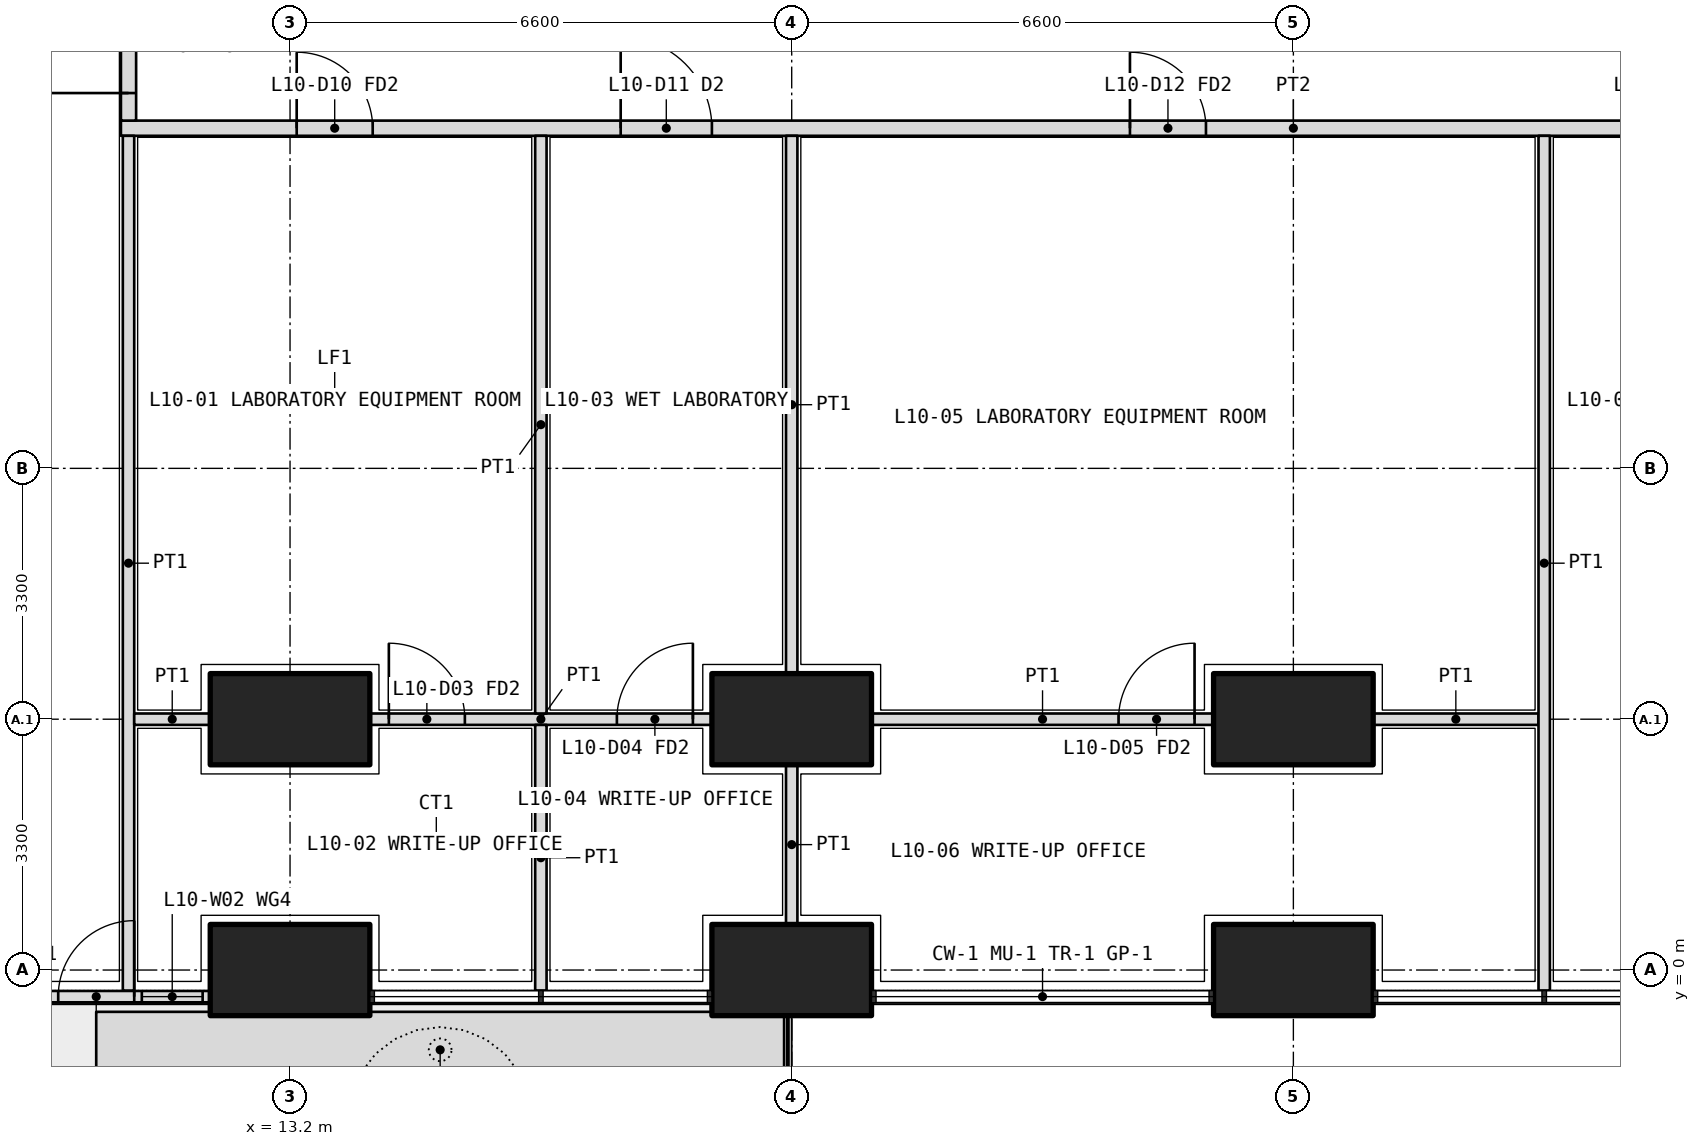
"""IFC4 building model, lengths in metres.
Left out: names, types, materials, properties, quantities, classifications, styles, units other than length and angle.
Written with IfcOpenShell. Run it as: python <this file> out.ifc"""

import sys

from ifc_helpers import new_model, si_unit, direction, frame, frame_2d, origin, origin_2d, place, context, subcontext, project, spatial, polyline, rectangle, outline, extrude, element, fill, save


model = new_model("IFC4")
c1 = context("Model", 3, precision=1e-05, world=origin(), true_north=direction((0.0, 1.0)))
c2 = subcontext(c1, "Body", "Model", "MODEL_VIEW")
j1 = project(units=[si_unit("LENGTHUNIT", "METRE"), si_unit("PLANEANGLEUNIT", "RADIAN")], contexts=[c1])
p1 = place(None, origin())
s1 = spatial("IfcSite", under=j1, at=p1, CompositionType="ELEMENT")
p2 = place(p1, origin())
s2 = spatial("IfcBuilding", under=s1, at=p2, CompositionType="ELEMENT")
p3 = place(p2, frame((0.0, 0.0, 46.5)))
s3 = spatial("IfcBuildingStorey", under=s2, at=p3, CompositionType="ELEMENT", Elevation=46.5)
for number, where, z_axis, x_axis in (
    (1, (13.2, 0.0, 0.0), (0.0, 0.0, 1.0), (1.0, 0.0, 0.0)),
    (2, (19.8, 0.0, 0.0), (0.0, 0.0, 1.0), (1.0, 0.0, 0.0)),
    (3, (26.4, 0.0, 0.0), (0.0, 0.0, 1.0), (1.0, 0.0, 0.0)),
    (4, (13.2, 3.3, 0.0), (0.0, 0.0, 1.0), (1.0, 0.0, 0.0)),
    (5, (19.8, 3.3, 0.0), (0.0, 0.0, 1.0), (1.0, 0.0, 0.0)),
    (6, (26.4, 3.3, 0.0), (0.0, 0.0, 1.0), (1.0, 0.0, 0.0)),
):
    element("IfcColumn", number, at=place(p3, frame(where, z_axis=z_axis, x_axis=x_axis)), inside=s3, PredefinedType="COLUMN", context=c2, shape_type="SweptSolid", body=[
        extrude(rectangle(XDim=2.1, YDim=1.2, at=origin_2d()), origin(), (0.0, 0.0, 1.0), 4.2),
    ])
p4 = place(p3, origin())
e7 = element("IfcWall", 7, at=p4, inside=s3, PredefinedType="USERDEFINED", context=c2, shape_type="SweptSolid", body=[
    extrude(outline(polyline([(10.65, -1.55), (19.7, -1.55), (19.7, -0.55), (10.65, -0.55), (10.65, -1.55)]), holes=[polyline([(10.8, -1.4), (19.55, -1.4), (19.55, -0.7), (10.8, -0.7), (10.8, -1.4)])]), origin(), (0.0, 0.0, 1.0), 1.05),
])
p5 = place(p3, frame((7.65, -0.35, 0.0), z_axis=(0.0, 0.0, 1.0), x_axis=(1.0, 0.0, 0.0)))
e8 = element("IfcWall", 8, at=p5, inside=s3, PredefinedType="SOLIDWALL", context=c2, shape_type="SweptSolid", body=[
    extrude(rectangle(XDim=4.5, YDim=0.15, at=frame_2d((2.25, 0.0))), origin(), (0.0, 0.0, 1.0), 2.7),
])
p6 = place(p5, frame((2.5, 0.0, 0.0)))
e9 = element("IfcOpeningElement", 9, at=p6, cuts=e8, PredefinedType="OPENING", context=c2, shape_type="SweptSolid", body=[
    extrude(rectangle(XDim=1.0, YDim=2.4, at=frame_2d((0.5, 1.2))), frame((0.0, 0.085, 0.0), z_axis=(0.0, -1.0, 0.0), x_axis=(1.0, 0.0, 0.0)), (0.0, 0.0, 1.0), 0.17),
])
p7 = place(p5, frame((0.1, 0.0, 0.1)))
e10 = element("IfcOpeningElement", 10, at=p7, cuts=e8, PredefinedType="OPENING", context=c2, shape_type="SweptSolid", body=[
    extrude(rectangle(XDim=1.9, YDim=2.3, at=frame_2d((0.95, 1.15))), frame((0.0, 0.085, 0.0), z_axis=(0.0, -1.0, 0.0), x_axis=(1.0, 0.0, 0.0)), (0.0, 0.0, 1.0), 0.17),
])
p8 = place(p5, frame((3.6, 0.0, 0.1)))
e11 = element("IfcOpeningElement", 11, at=p8, cuts=e8, PredefinedType="OPENING", context=c2, shape_type="SweptSolid", body=[
    extrude(rectangle(XDim=0.8, YDim=2.3, at=frame_2d((0.4, 1.15))), frame((0.0, 0.085, 0.0), z_axis=(0.0, -1.0, 0.0), x_axis=(1.0, 0.0, 0.0)), (0.0, 0.0, 1.0), 0.17),
])
p9 = place(p3, frame((10.975, 11.075, 0.0), z_axis=(0.0, 0.0, 1.0), x_axis=(1.0, 0.0, 0.0)))
e12 = element("IfcWall", 12, at=p9, inside=s3, PredefinedType="PARTITIONING", context=c2, shape_type="SweptSolid", body=[
    extrude(rectangle(XDim=30.85, YDim=0.2, at=frame_2d((15.425, 0.0))), origin(), (0.0, 0.0, 1.0), 2.85),
])
p10 = place(p9, frame((2.312, 0.0, 0.0)))
e13 = element("IfcOpeningElement", 13, at=p10, cuts=e12, PredefinedType="OPENING", context=c2, shape_type="SweptSolid", body=[
    extrude(rectangle(XDim=1.0, YDim=2.1, at=frame_2d((0.5, 1.05))), frame((0.0, 0.11, 0.0), z_axis=(0.0, -1.0, 0.0), x_axis=(1.0, 0.0, 0.0)), (0.0, 0.0, 1.0), 0.22),
])
p11 = place(p9, frame((6.575, 0.0, 0.0)))
e14 = element("IfcOpeningElement", 14, at=p11, cuts=e12, PredefinedType="OPENING", context=c2, shape_type="SweptSolid", body=[
    extrude(rectangle(XDim=1.2, YDim=2.1, at=frame_2d((0.6, 1.05))), frame((0.0, 0.11, 0.0), z_axis=(0.0, -1.0, 0.0), x_axis=(1.0, 0.0, 0.0)), (0.0, 0.0, 1.0), 0.22),
])
p12 = place(p9, frame((13.275, 0.0, 0.0)))
e15 = element("IfcOpeningElement", 15, at=p12, cuts=e12, PredefinedType="OPENING", context=c2, shape_type="SweptSolid", body=[
    extrude(rectangle(XDim=1.0, YDim=2.1, at=frame_2d((0.5, 1.05))), frame((0.0, 0.11, 0.0), z_axis=(0.0, -1.0, 0.0), x_axis=(1.0, 0.0, 0.0)), (0.0, 0.0, 1.0), 0.22),
])
p13 = place(p9, frame((19.975, 0.0, 0.0)))
e16 = element("IfcOpeningElement", 16, at=p13, cuts=e12, PredefinedType="OPENING", context=c2, shape_type="SweptSolid", body=[
    extrude(rectangle(XDim=1.0, YDim=2.1, at=frame_2d((0.5, 1.05))), frame((0.0, 0.11, 0.0), z_axis=(0.0, -1.0, 0.0), x_axis=(1.0, 0.0, 0.0)), (0.0, 0.0, 1.0), 0.22),
])
p14 = place(p9, frame((23.275, 0.0, 0.0)))
e17 = element("IfcOpeningElement", 17, at=p14, cuts=e12, PredefinedType="OPENING", context=c2, shape_type="SweptSolid", body=[
    extrude(rectangle(XDim=1.0, YDim=2.1, at=frame_2d((0.5, 1.05))), frame((0.0, 0.11, 0.0), z_axis=(0.0, -1.0, 0.0), x_axis=(1.0, 0.0, 0.0)), (0.0, 0.0, 1.0), 0.22),
])
p15 = place(p9, frame((27.438, 0.0, 0.0)))
e18 = element("IfcOpeningElement", 18, at=p15, cuts=e12, PredefinedType="OPENING", context=c2, shape_type="SweptSolid", body=[
    extrude(rectangle(XDim=1.2, YDim=2.1, at=frame_2d((0.6, 1.05))), frame((0.0, 0.11, 0.0), z_axis=(0.0, -1.0, 0.0), x_axis=(1.0, 0.0, 0.0)), (0.0, 0.0, 1.0), 0.22),
])
p16 = place(p3, frame((11.075, 11.175, 0.0), z_axis=(0.0, 0.0, 1.0), x_axis=(0.0, 1.0, 0.0)))
e19 = element("IfcWall", 19, at=p16, inside=s3, PredefinedType="PARTITIONING", context=c2, shape_type="SweptSolid", body=[
    extrude(rectangle(XDim=15.225, YDim=0.2, at=frame_2d((7.612, 0.0))), origin(), (0.0, 0.0, 1.0), 2.85),
])
p17 = place(p16, frame((0.363, 0.0, 0.0)))
e20 = element("IfcOpeningElement", 20, at=p17, cuts=e19, PredefinedType="OPENING", context=c2, shape_type="SweptSolid", body=[
    extrude(rectangle(XDim=1.2, YDim=2.1, at=frame_2d((0.6, 1.05))), frame((0.0, 0.11, 0.0), z_axis=(0.0, -1.0, 0.0), x_axis=(1.0, 0.0, 0.0)), (0.0, 0.0, 1.0), 0.22),
])
p18 = place(p16, frame((2.575, 0.0, 0.0)))
e21 = element("IfcOpeningElement", 21, at=p18, cuts=e19, PredefinedType="OPENING", context=c2, shape_type="SweptSolid", body=[
    extrude(rectangle(XDim=1.0, YDim=2.1, at=frame_2d((0.5, 1.05))), frame((0.0, 0.11, 0.0), z_axis=(0.0, -1.0, 0.0), x_axis=(1.0, 0.0, 0.0)), (0.0, 0.0, 1.0), 0.22),
])
p19 = place(p16, frame((5.625, 0.0, 0.0)))
e22 = element("IfcOpeningElement", 22, at=p19, cuts=e19, PredefinedType="OPENING", context=c2, shape_type="SweptSolid", body=[
    extrude(rectangle(XDim=0.9, YDim=2.1, at=frame_2d((0.45, 1.05))), frame((0.0, 0.11, 0.0), z_axis=(0.0, -1.0, 0.0), x_axis=(1.0, 0.0, 0.0)), (0.0, 0.0, 1.0), 0.22),
])
p20 = place(p16, frame((9.425, 0.0, 0.0)))
e23 = element("IfcOpeningElement", 23, at=p20, cuts=e19, PredefinedType="OPENING", context=c2, shape_type="SweptSolid", body=[
    extrude(rectangle(XDim=0.9, YDim=2.1, at=frame_2d((0.45, 1.05))), frame((0.0, 0.11, 0.0), z_axis=(0.0, -1.0, 0.0), x_axis=(1.0, 0.0, 0.0)), (0.0, 0.0, 1.0), 0.22),
])
p21 = place(p16, frame((12.975, 0.0, 0.0)))
e24 = element("IfcOpeningElement", 24, at=p21, cuts=e19, PredefinedType="OPENING", context=c2, shape_type="SweptSolid", body=[
    extrude(rectangle(XDim=1.0, YDim=2.1, at=frame_2d((0.5, 1.05))), frame((0.0, 0.11, 0.0), z_axis=(0.0, -1.0, 0.0), x_axis=(1.0, 0.0, 0.0)), (0.0, 0.0, 1.0), 0.22),
])
p22 = place(p3, frame((11.075, -0.27, 0.0), z_axis=(0.0, 0.0, 1.0), x_axis=(0.0, 1.0, 0.0)))
e25 = element("IfcWall", 25, at=p22, inside=s3, PredefinedType="PARTITIONING", context=c2, shape_type="SweptSolid", body=[
    extrude(rectangle(XDim=11.245, YDim=0.15, at=frame_2d((5.623, 0.0))), origin(), (0.0, 0.0, 1.0), 2.7),
])
p23 = place(p3, frame((11.15, 3.3, 0.0), z_axis=(0.0, 0.0, 1.0), x_axis=(1.0, 0.0, 0.0)))
e26 = element("IfcWall", 26, at=p23, inside=s3, PredefinedType="PARTITIONING", context=c2, shape_type="SweptSolid", body=[
    extrude(rectangle(XDim=1.0, YDim=0.15, at=frame_2d((0.5, 0.0))), origin(), (0.0, 0.0, 1.0), 3.9),
])
p24 = place(p3, frame((14.25, 3.3, 0.0), z_axis=(0.0, 0.0, 1.0), x_axis=(1.0, 0.0, 0.0)))
e27 = element("IfcWall", 27, at=p24, inside=s3, PredefinedType="PARTITIONING", context=c2, shape_type="SweptSolid", body=[
    extrude(rectangle(XDim=4.5, YDim=0.15, at=frame_2d((2.25, 0.0))), origin(), (0.0, 0.0, 1.0), 3.9),
])
p25 = place(p24, frame((0.25, 0.0, 0.0)))
e28 = element("IfcOpeningElement", 28, at=p25, cuts=e27, PredefinedType="OPENING", context=c2, shape_type="SweptSolid", body=[
    extrude(rectangle(XDim=1.0, YDim=2.1, at=frame_2d((0.5, 1.05))), frame((0.0, 0.085, 0.0), z_axis=(0.0, -1.0, 0.0), x_axis=(1.0, 0.0, 0.0)), (0.0, 0.0, 1.0), 0.17),
])
p26 = place(p24, frame((3.25, 0.0, 0.0)))
e29 = element("IfcOpeningElement", 29, at=p26, cuts=e27, PredefinedType="OPENING", context=c2, shape_type="SweptSolid", body=[
    extrude(rectangle(XDim=1.0, YDim=2.1, at=frame_2d((0.5, 1.05))), frame((0.0, 0.085, 0.0), z_axis=(0.0, -1.0, 0.0), x_axis=(1.0, 0.0, 0.0)), (0.0, 0.0, 1.0), 0.17),
])
p27 = place(p3, frame((20.85, 3.3, 0.0), z_axis=(0.0, 0.0, 1.0), x_axis=(1.0, 0.0, 0.0)))
e30 = element("IfcWall", 30, at=p27, inside=s3, PredefinedType="PARTITIONING", context=c2, shape_type="SweptSolid", body=[
    extrude(rectangle(XDim=4.5, YDim=0.15, at=frame_2d((2.25, 0.0))), origin(), (0.0, 0.0, 1.0), 3.9),
])
p28 = place(p27, frame((3.25, 0.0, 0.0)))
e31 = element("IfcOpeningElement", 31, at=p28, cuts=e30, PredefinedType="OPENING", context=c2, shape_type="SweptSolid", body=[
    extrude(rectangle(XDim=1.0, YDim=2.1, at=frame_2d((0.5, 1.05))), frame((0.0, 0.085, 0.0), z_axis=(0.0, -1.0, 0.0), x_axis=(1.0, 0.0, 0.0)), (0.0, 0.0, 1.0), 0.17),
])
p29 = place(p3, frame((27.45, 3.3, 0.0), z_axis=(0.0, 0.0, 1.0), x_axis=(1.0, 0.0, 0.0)))
e32 = element("IfcWall", 32, at=p29, inside=s3, PredefinedType="PARTITIONING", context=c2, shape_type="SweptSolid", body=[
    extrude(rectangle(XDim=2.175, YDim=0.15, at=frame_2d((1.087, 0.0))), origin(), (0.0, 0.0, 1.0), 3.9),
])
p30 = place(p3, frame((16.5, -0.27, 0.0), z_axis=(0.0, 0.0, 1.0), x_axis=(0.0, 1.0, 0.0)))
e33 = element("IfcWall", 33, at=p30, inside=s3, PredefinedType="PARTITIONING", context=c2, shape_type="SweptSolid", body=[
    extrude(rectangle(XDim=3.495, YDim=0.15, at=frame_2d((1.748, 0.0))), origin(), (0.0, 0.0, 1.0), 2.7),
])
p31 = place(p3, frame((16.5, 3.375, 0.0), z_axis=(0.0, 0.0, 1.0), x_axis=(0.0, 1.0, 0.0)))
e34 = element("IfcWall", 34, at=p31, inside=s3, PredefinedType="PARTITIONING", context=c2, shape_type="SweptSolid", body=[
    extrude(rectangle(XDim=7.6, YDim=0.15, at=frame_2d((3.8, 0.0))), origin(), (0.0, 0.0, 1.0), 3.9),
])
p32 = place(p3, frame((19.8, 0.6, 0.0), z_axis=(0.0, 0.0, 1.0), x_axis=(0.0, 1.0, 0.0)))
e35 = element("IfcWall", 35, at=p32, inside=s3, PredefinedType="PARTITIONING", context=c2, shape_type="SweptSolid", body=[
    extrude(rectangle(XDim=2.1, YDim=0.15, at=frame_2d((1.05, 0.0))), origin(), (0.0, 0.0, 1.0), 2.85),
])
p33 = place(p3, frame((19.8, 3.9, 0.0), z_axis=(0.0, 0.0, 1.0), x_axis=(0.0, 1.0, 0.0)))
e36 = element("IfcWall", 36, at=p33, inside=s3, PredefinedType="PARTITIONING", context=c2, shape_type="SweptSolid", body=[
    extrude(rectangle(XDim=7.075, YDim=0.15, at=frame_2d((3.538, 0.0))), origin(), (0.0, 0.0, 1.0), 2.85),
])
p34 = place(p3, frame((29.7, -0.27, 0.0), z_axis=(0.0, 0.0, 1.0), x_axis=(0.0, 1.0, 0.0)))
e37 = element("IfcWall", 37, at=p34, inside=s3, PredefinedType="PARTITIONING", context=c2, shape_type="SweptSolid", body=[
    extrude(rectangle(XDim=11.245, YDim=0.15, at=frame_2d((5.623, 0.0))), origin(), (0.0, 0.0, 1.0), 2.7),
])
p35 = place(p6, origin())
e38 = element("IfcDoor", 38, at=p35, inside=s3, OperationType="SINGLE_SWING_RIGHT", PredefinedType="DOOR", context=c2, shape_type="SweptSolid", body=[
    extrude(rectangle(XDim=1.0, YDim=2.4, at=frame_2d((0.5, 1.2))), frame((0.0, 0.025, 0.0), z_axis=(0.0, -1.0, 0.0), x_axis=(1.0, 0.0, 0.0)), (0.0, 0.0, 1.0), 0.05),
])
fill(e9, e38)
p36 = place(p8, origin())
e39 = element("IfcWindow", 39, at=p36, inside=s3, PartitioningType="SINGLE_PANEL", PredefinedType="WINDOW", context=c2, shape_type="SweptSolid", body=[
    extrude(rectangle(XDim=0.8, YDim=2.3, at=frame_2d((0.4, 1.15))), frame((0.0, 0.03, 0.0), z_axis=(0.0, -1.0, 0.0), x_axis=(1.0, 0.0, 0.0)), (0.0, 0.0, 1.0), 0.06),
])
fill(e11, e39)
p37 = place(p10, origin())
e40 = element("IfcDoor", 40, at=p37, inside=s3, OperationType="SINGLE_SWING_LEFT", PredefinedType="DOOR", context=c2, shape_type="SweptSolid", body=[
    extrude(rectangle(XDim=1.0, YDim=2.1, at=frame_2d((0.5, 1.05))), frame((0.0, 0.025, 0.0), z_axis=(0.0, -1.0, 0.0), x_axis=(1.0, 0.0, 0.0)), (0.0, 0.0, 1.0), 0.05),
])
fill(e13, e40)
p38 = place(p25, origin())
e41 = element("IfcDoor", 41, at=p38, inside=s3, OperationType="SINGLE_SWING_LEFT", PredefinedType="DOOR", context=c2, shape_type="SweptSolid", body=[
    extrude(rectangle(XDim=1.0, YDim=2.1, at=frame_2d((0.5, 1.05))), frame((0.0, 0.025, 0.0), z_axis=(0.0, -1.0, 0.0), x_axis=(1.0, 0.0, 0.0)), (0.0, 0.0, 1.0), 0.05),
])
fill(e28, e41)
p39 = place(p11, origin())
e42 = element("IfcDoor", 42, at=p39, inside=s3, OperationType="DOUBLE_DOOR_SINGLE_SWING", PredefinedType="DOOR", context=c2, shape_type="SweptSolid", body=[
    extrude(rectangle(XDim=1.2, YDim=2.1, at=frame_2d((0.6, 1.05))), frame((0.0, 0.025, 0.0), z_axis=(0.0, -1.0, 0.0), x_axis=(1.0, 0.0, 0.0)), (0.0, 0.0, 1.0), 0.05),
])
fill(e14, e42)
p40 = place(p26, origin())
e43 = element("IfcDoor", 43, at=p40, inside=s3, OperationType="SINGLE_SWING_RIGHT", PredefinedType="DOOR", context=c2, shape_type="SweptSolid", body=[
    extrude(rectangle(XDim=1.0, YDim=2.1, at=frame_2d((0.5, 1.05))), frame((0.0, 0.025, 0.0), z_axis=(0.0, -1.0, 0.0), x_axis=(1.0, 0.0, 0.0)), (0.0, 0.0, 1.0), 0.05),
])
fill(e29, e43)
p41 = place(p12, origin())
e44 = element("IfcDoor", 44, at=p41, inside=s3, OperationType="SINGLE_SWING_LEFT", PredefinedType="DOOR", context=c2, shape_type="SweptSolid", body=[
    extrude(rectangle(XDim=1.0, YDim=2.1, at=frame_2d((0.5, 1.05))), frame((0.0, 0.025, 0.0), z_axis=(0.0, -1.0, 0.0), x_axis=(1.0, 0.0, 0.0)), (0.0, 0.0, 1.0), 0.05),
])
fill(e15, e44)
p42 = place(p28, origin())
e45 = element("IfcDoor", 45, at=p42, inside=s3, OperationType="SINGLE_SWING_RIGHT", PredefinedType="DOOR", context=c2, shape_type="SweptSolid", body=[
    extrude(rectangle(XDim=1.0, YDim=2.1, at=frame_2d((0.5, 1.05))), frame((0.0, 0.025, 0.0), z_axis=(0.0, -1.0, 0.0), x_axis=(1.0, 0.0, 0.0)), (0.0, 0.0, 1.0), 0.05),
])
fill(e31, e45)
p43 = place(p17, origin())
e46 = element("IfcDoor", 46, at=p43, inside=s3, OperationType="DOUBLE_DOOR_SINGLE_SWING", PredefinedType="DOOR", context=c2, shape_type="SweptSolid", body=[
    extrude(rectangle(XDim=1.2, YDim=2.1, at=frame_2d((0.6, 1.05))), frame((0.0, 0.025, 0.0), z_axis=(0.0, -1.0, 0.0), x_axis=(1.0, 0.0, 0.0)), (0.0, 0.0, 1.0), 0.05),
])
fill(e20, e46)
save(model, sys.argv[1])
